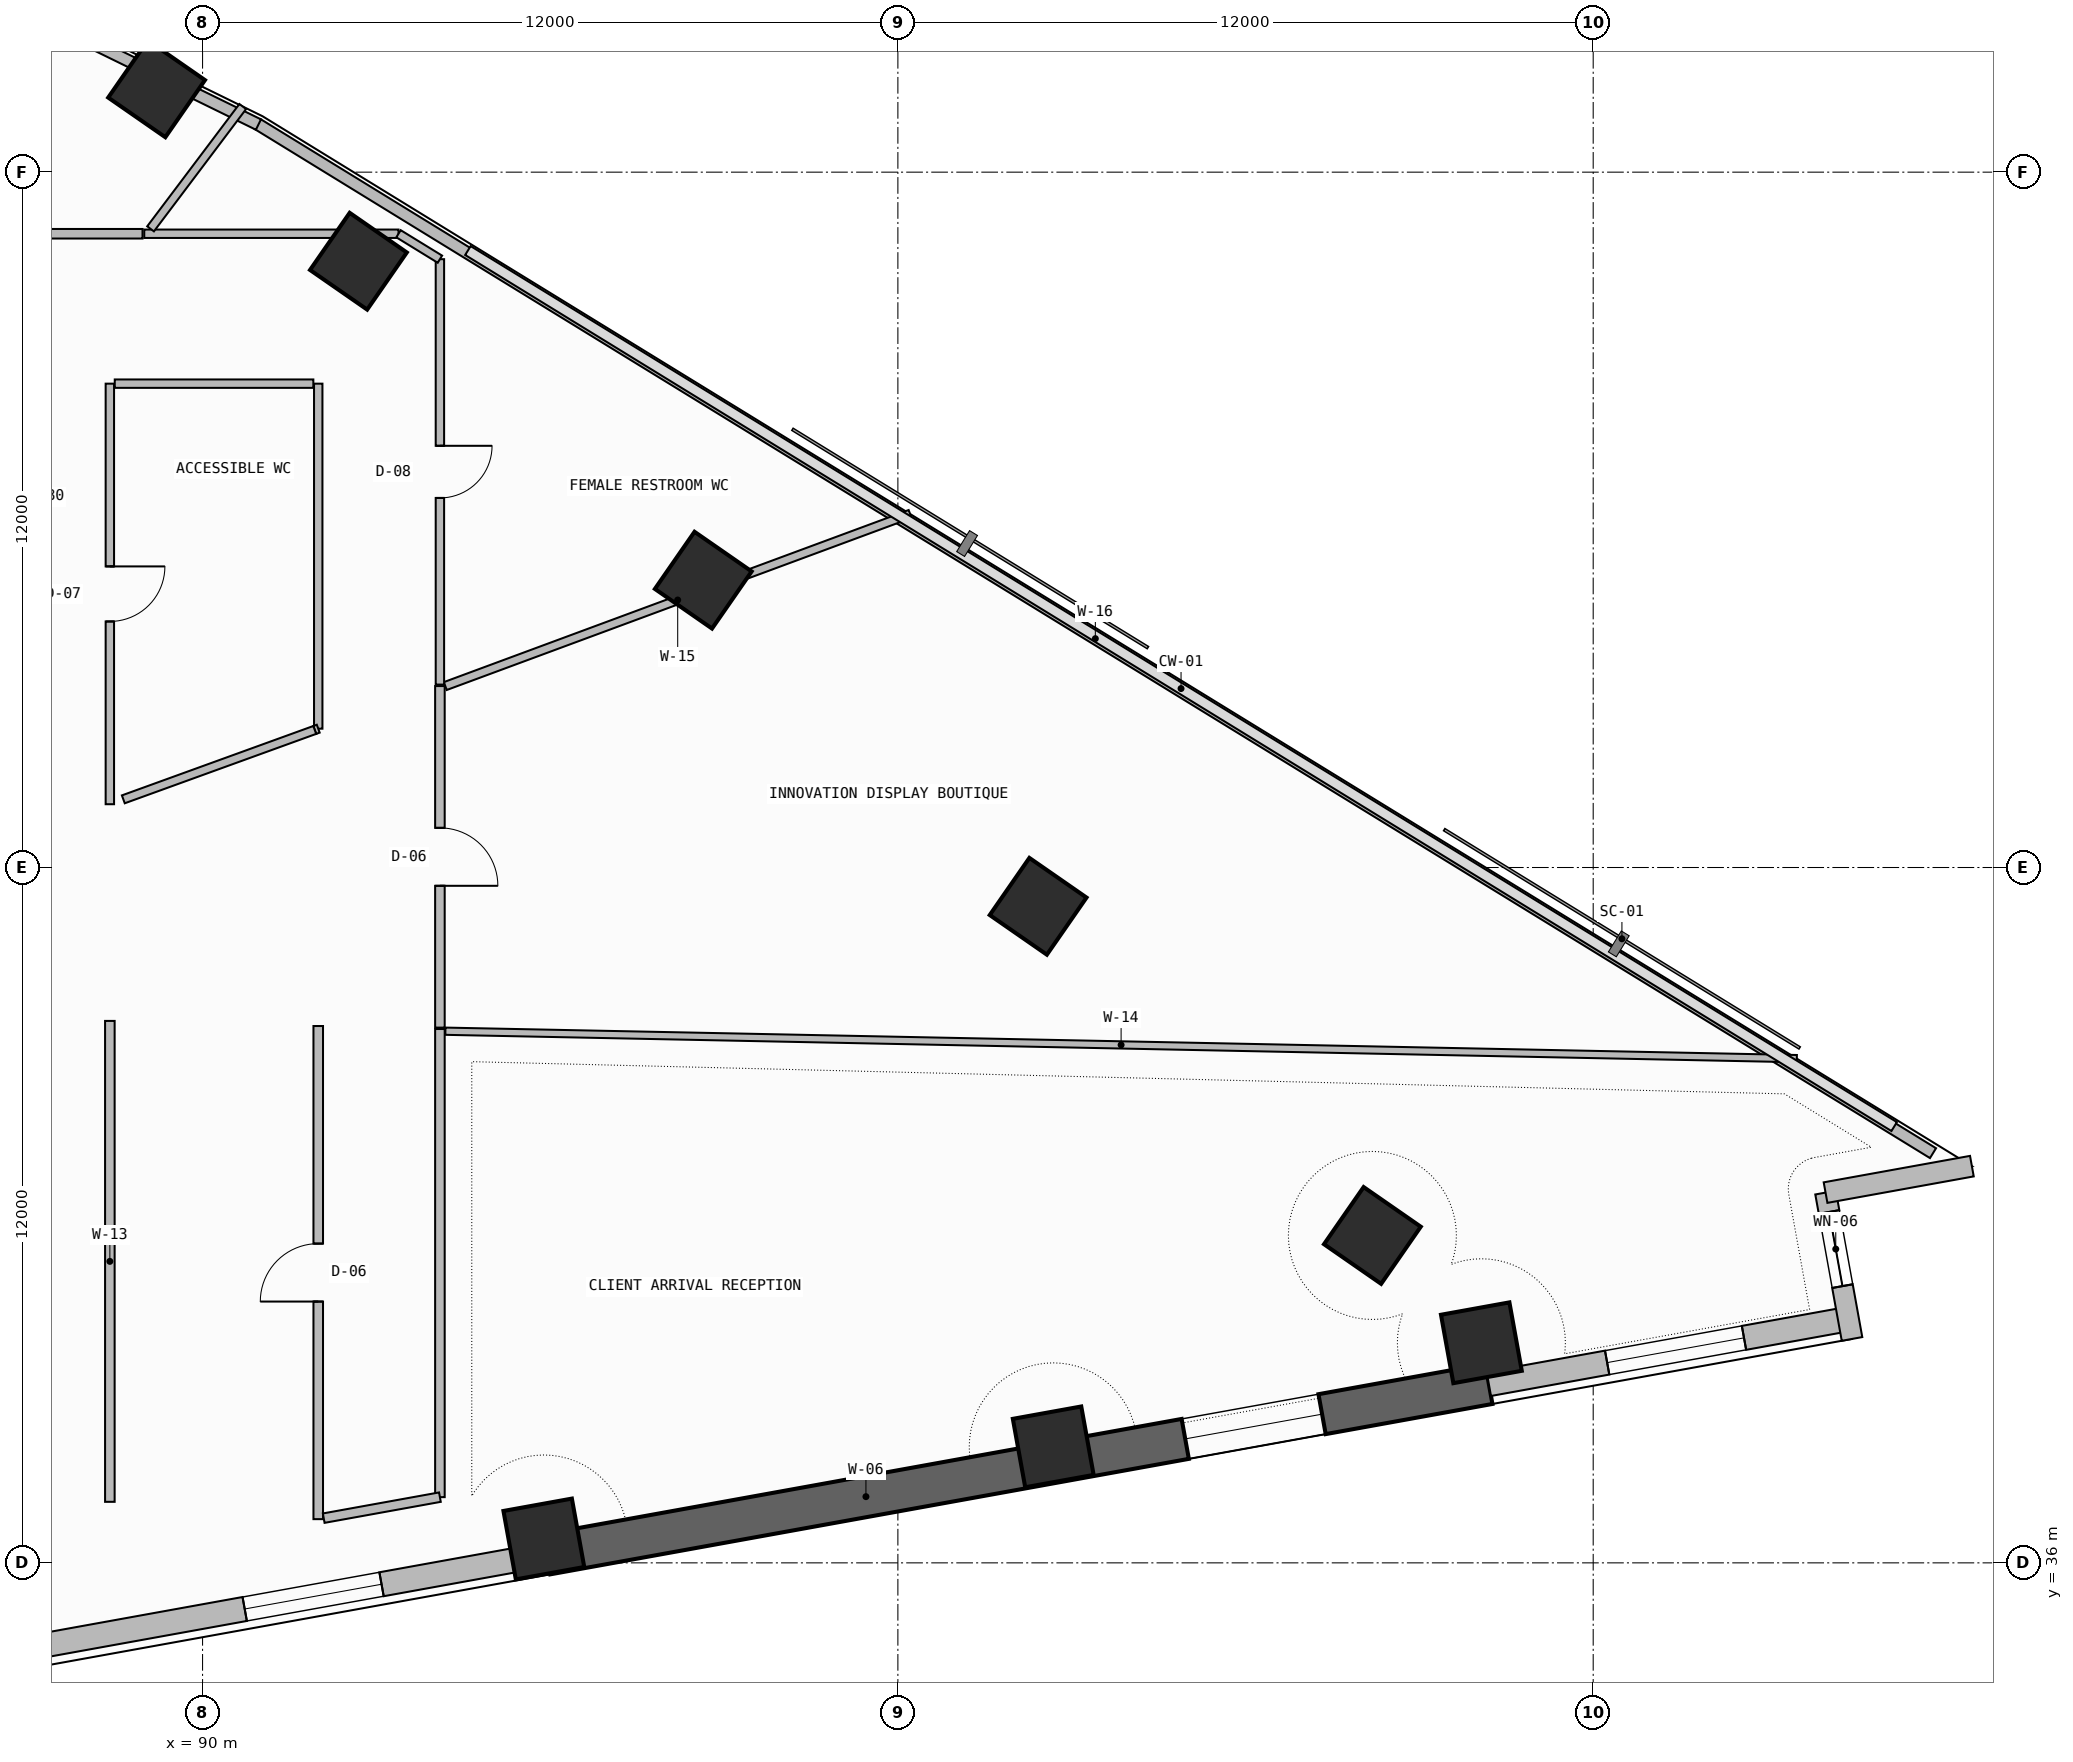
"""IFC4 building model, lengths in metres.
Left out: names, types, materials, properties, quantities, classifications, styles, units other than length and angle.
Written with IfcOpenShell. Run it as: python <this file> out.ifc"""

import sys

from ifc_helpers import new_model, si_unit, direction, frame, frame_2d, origin, origin_2d, place, context, subcontext, project, spatial, rectangle, extrude, element, fill, save


model = new_model("IFC4")
c1 = context("Model", 3, precision=1e-05, world=origin(), true_north=direction((0.0, 1.0)))
c2 = subcontext(c1, "Body", "Model", "MODEL_VIEW")
j1 = project(units=[si_unit("LENGTHUNIT", "METRE"), si_unit("PLANEANGLEUNIT", "RADIAN")], contexts=[c1])
p1 = place(None, origin())
s1 = spatial("IfcSite", under=j1, at=p1, CompositionType="ELEMENT")
p2 = place(p1, origin())
s2 = spatial("IfcBuilding", under=s1, at=p2, CompositionType="ELEMENT")
p3 = place(p2, frame((0.0, 0.0, 106.5)))
s3 = spatial("IfcBuildingStorey", under=s2, at=p3, CompositionType="ELEMENT", Elevation=106.5)
for number, where, z_axis, x_axis in (
    (1, (95.89, 36.412, 0.0), (0.0, 0.0, 1.0), (0.984, 0.178, 0.0)),
    (2, (104.681, 38.001, 0.0), (0.0, 0.0, 1.0), (0.984, 0.178, 0.0)),
    (3, (112.07, 39.798, 0.0), (0.0, 0.0, 1.0), (0.984, 0.178, 0.0)),
    (4, (110.189, 41.65, 0.0), (0.0, 0.0, 1.0), (0.57, 0.822, 0.0)),
    (5, (104.42, 47.331, 0.0), (0.0, 0.0, 1.0), (0.57, 0.822, 0.0)),
    (6, (98.641, 52.958, 0.0), (0.0, 0.0, 1.0), (0.57, 0.822, 0.0)),
    (7, (92.69, 58.463, 0.0), (0.0, 0.0, 1.0), (0.57, 0.822, 0.0)),
    (8, (89.207, 61.438, 0.0), (0.0, 0.0, 1.0), (0.57, 0.822, 0.0)),
):
    element("IfcColumn", number, at=place(p3, frame(where, z_axis=z_axis, x_axis=x_axis)), inside=s3, PredefinedType="COLUMN", context=c2, shape_type="SweptSolid", body=[
        extrude(rectangle(XDim=1.2, YDim=1.2, at=origin_2d()), origin(), (0.0, 0.0, 1.0), 3.6),
    ])
p4 = place(p3, frame((86.1, 34.367, 0.0), z_axis=(0.0, 0.0, 1.0), x_axis=(0.9840437071, 0.177926902172, 0.0)))
e9 = element("IfcWall", 9, at=p4, inside=s3, PredefinedType="SOLIDWALL", context=c2, shape_type="SweptSolid", body=[
    extrude(rectangle(XDim=9.997, YDim=0.42, at=frame_2d((4.999, 0.0))), origin(), (0.0, 0.0, 1.0), 2.325),
])
p5 = place(p4, frame((4.702, 0.0, 1.2)))
e10 = element("IfcOpeningElement", 10, at=p5, cuts=e9, PredefinedType="OPENING", context=c2, shape_type="SweptSolid", body=[
    extrude(rectangle(XDim=2.4, YDim=0.9, at=frame_2d((1.2, 0.45))), frame((0.0, 0.22, 0.0), z_axis=(0.0, -1.0, 0.0), x_axis=(1.0, 0.0, 0.0)), (0.0, 0.0, 1.0), 0.44),
])
p6 = place(p3, frame((95.938, 36.146, -0.26), z_axis=(0.0, 0.0, 1.0), x_axis=(0.984038488288, 0.177955762952, 0.0)))
e11 = element("IfcWall", 11, at=p6, inside=s3, PredefinedType="SHEAR", context=c2, shape_type="SweptSolid", body=[
    extrude(rectangle(XDim=16.525, YDim=0.7, at=frame_2d((8.262, 0.0))), origin(), (0.0, 0.0, 1.0), 3.6),
])
p7 = place(p6, frame((11.2, 0.0, 1.2)))
e12 = element("IfcOpeningElement", 12, at=p7, cuts=e11, PredefinedType="OPENING", context=c2, shape_type="SweptSolid", body=[
    extrude(rectangle(XDim=2.4, YDim=0.9, at=frame_2d((1.2, 0.45))), frame((0.0, 0.36, 0.0), z_axis=(0.0, -1.0, 0.0), x_axis=(1.0, 0.0, 0.0)), (0.0, 0.0, 1.0), 0.72),
])
p8 = place(p3, frame((112.199, 39.087, 0.0), z_axis=(0.0, 0.0, 1.0), x_axis=(0.984042888215, 0.177931431042, 0.0)))
e13 = element("IfcWall", 13, at=p8, inside=s3, PredefinedType="SOLIDWALL", context=c2, shape_type="SweptSolid", body=[
    extrude(rectangle(XDim=6.306, YDim=0.42, at=frame_2d((3.153, 0.0))), origin(), (0.0, 0.0, 1.0), 3.34),
])
p9 = place(p8, frame((2.075, 0.0, 1.2)))
e14 = element("IfcOpeningElement", 14, at=p9, cuts=e13, PredefinedType="OPENING", context=c2, shape_type="SweptSolid", body=[
    extrude(rectangle(XDim=2.4, YDim=0.9, at=frame_2d((1.2, 0.45))), frame((0.0, 0.22, 0.0), z_axis=(0.0, -1.0, 0.0), x_axis=(1.0, 0.0, 0.0)), (0.0, 0.0, 1.0), 0.44),
])
p10 = place(p3, frame((118.467, 39.864, 0.0), z_axis=(0.0, 0.0, 1.0), x_axis=(-0.177897493713, 0.984049024048, 0.0)))
e15 = element("IfcWall", 15, at=p10, inside=s3, PredefinedType="SOLIDWALL", context=c2, shape_type="SweptSolid", body=[
    extrude(rectangle(XDim=2.566, YDim=0.36, at=frame_2d((1.283, 0.0))), origin(), (0.0, 0.0, 1.0), 3.34),
])
p11 = place(p10, frame((0.926, 0.0, 0.45)))
e16 = element("IfcOpeningElement", 16, at=p11, cuts=e15, PredefinedType="OPENING", context=c2, shape_type="SweptSolid", body=[
    extrude(rectangle(XDim=1.3, YDim=2.4, at=frame_2d((0.65, 1.2))), frame((0.0, 0.19, 0.0), z_axis=(0.0, -1.0, 0.0), x_axis=(1.0, 0.0, 0.0)), (0.0, 0.0, 1.0), 0.38),
])
p12 = place(p3, frame((118.01, 42.39, 0.0), z_axis=(0.0, 0.0, 1.0), x_axis=(0.984046012923, 0.177914149102, 0.0)))
e17 = element("IfcWall", 17, at=p12, inside=s3, PredefinedType="SOLIDWALL", context=c2, shape_type="SweptSolid", body=[
    extrude(rectangle(XDim=2.566, YDim=0.36, at=frame_2d((1.283, 0.0))), origin(), (0.0, 0.0, 1.0), 3.34),
])
p13 = place(p3, frame((119.865, 43.07, 0.0), z_axis=(0.0, 0.0, 1.0), x_axis=(-0.852110824326, 0.52336138859, 0.0)))
e18 = element("IfcWall", 18, at=p13, inside=s3, PredefinedType="PARAPET", context=c2, shape_type="SweptSolid", body=[
    extrude(rectangle(XDim=33.932, YDim=0.2, at=frame_2d((16.966, 0.0))), origin(), (0.0, 0.0, 1.0), 1.15),
])
p14 = place(p3, frame((90.964, 60.822, 0.0), z_axis=(0.0, 0.0, 1.0), x_axis=(-0.898000468284, 0.439994498787, 0.0)))
e19 = element("IfcWall", 19, at=p14, inside=s3, PredefinedType="PARAPET", context=c2, shape_type="SweptSolid", body=[
    extrude(rectangle(XDim=1.423, YDim=0.2, at=frame_2d((0.712, 0.0))), origin(), (0.0, 0.0, 1.0), 1.15),
])
p15 = place(p3, frame((88.921, 61.823, 0.0), z_axis=(0.0, 0.0, 1.0), x_axis=(-0.897993533426, 0.440008652103, 0.0)))
e20 = element("IfcWall", 20, at=p15, inside=s3, PredefinedType="PARAPET", context=c2, shape_type="SweptSolid", body=[
    extrude(rectangle(XDim=26.864, YDim=0.2, at=frame_2d((13.432, 0.0))), origin(), (0.0, 0.0, 1.0), 1.15),
])
p16 = place(p3, frame((91.996, 45.264, 0.0), z_axis=(0.0, 0.0, 1.0), x_axis=(0.0, -1.0, 0.0)))
e21 = element("IfcWall", 21, at=p16, inside=s3, PredefinedType="PARTITIONING", context=c2, shape_type="SweptSolid", body=[
    extrude(rectangle(XDim=8.51, YDim=0.165, at=frame_2d((4.255, 0.0))), origin(), (0.0, 0.0, 1.0), 2.725),
])
p17 = place(p16, frame((3.755, 0.0, 0.0)))
e22 = element("IfcOpeningElement", 22, at=p17, cuts=e21, PredefinedType="OPENING", context=c2, shape_type="SweptSolid", body=[
    extrude(rectangle(XDim=1.0, YDim=2.2, at=frame_2d((0.5, 1.1))), frame((0.0, 0.093, 0.0), z_axis=(0.0, -1.0, 0.0), x_axis=(1.0, 0.0, 0.0)), (0.0, 0.0, 1.0), 0.185),
])
p18 = place(p3, frame((88.4, 37.053, 0.0), z_axis=(0.0, 0.0, 1.0), x_axis=(0.0, 1.0, 0.0)))
e23 = element("IfcWall", 23, at=p18, inside=s3, PredefinedType="PARTITIONING", context=c2, shape_type="SweptSolid", body=[
    extrude(rectangle(XDim=8.299, YDim=0.165, at=frame_2d((4.15, 0.0))), origin(), (0.0, 0.0, 1.0), 2.725),
])
p19 = place(p3, frame((94.096, 37.134, 0.0), z_axis=(0.0, 0.0, 1.0), x_axis=(0.0, 1.0, 0.0)))
e24 = element("IfcWall", 24, at=p19, inside=s3, PredefinedType="PARTITIONING", context=c2, shape_type="SweptSolid", body=[
    extrude(rectangle(XDim=8.079, YDim=0.165, at=frame_2d((4.04, 0.0))), origin(), (0.0, 0.0, 1.0), 2.725),
])
p20 = place(p3, frame((92.091, 36.771, 0.0), z_axis=(0.0, 0.0, 1.0), x_axis=(0.984047685875, 0.17790489573, 0.0)))
e25 = element("IfcWall", 25, at=p20, inside=s3, PredefinedType="PARTITIONING", context=c2, shape_type="SweptSolid", body=[
    extrude(rectangle(XDim=2.038, YDim=0.165, at=frame_2d((1.019, 0.0))), origin(), (0.0, 0.0, 1.0), 3.34),
])
p21 = place(p3, frame((94.191, 45.175, 0.0), z_axis=(0.0, 0.0, 1.0), x_axis=(0.99979429886, -0.020282010941, 0.0)))
e26 = element("IfcWall", 26, at=p21, inside=s3, PredefinedType="PARTITIONING", context=c2, shape_type="SweptSolid", body=[
    extrude(rectangle(XDim=23.328, YDim=0.125, at=frame_2d((11.664, 0.0))), origin(), (0.0, 0.0, 1.0), 2.725),
])
p22 = place(p3, frame((94.096, 45.237, 0.0), z_axis=(0.0, 0.0, 1.0), x_axis=(0.0, 1.0, 0.0)))
e27 = element("IfcWall", 27, at=p22, inside=s3, PredefinedType="PARTITIONING", context=c2, shape_type="SweptSolid", body=[
    extrude(rectangle(XDim=5.894, YDim=0.165, at=frame_2d((2.947, 0.0))), origin(), (0.0, 0.0, 1.0), 2.725),
])
p23 = place(p22, frame((2.447, 0.0, 0.0)))
e28 = element("IfcOpeningElement", 28, at=p23, cuts=e27, PredefinedType="OPENING", context=c2, shape_type="SweptSolid", body=[
    extrude(rectangle(XDim=1.0, YDim=2.2, at=frame_2d((0.5, 1.1))), frame((0.0, 0.093, 0.0), z_axis=(0.0, -1.0, 0.0), x_axis=(1.0, 0.0, 0.0)), (0.0, 0.0, 1.0), 0.185),
])
p24 = place(p3, frame((94.189, 51.131, 0.0), z_axis=(0.0, 0.0, 1.0), x_axis=(0.937797640871, 0.347182350901, 0.0)))
e29 = element("IfcWall", 29, at=p24, inside=s3, PredefinedType="PARTITIONING", context=c2, shape_type="SweptSolid", body=[
    extrude(rectangle(XDim=8.554, YDim=0.145, at=frame_2d((4.277, 0.0))), origin(), (0.0, 0.0, 1.0), 2.725),
])
p25 = place(p3, frame((94.096, 51.157, 0.0), z_axis=(0.0, 0.0, 1.0), x_axis=(0.0, 1.0, 0.0)))
e30 = element("IfcWall", 30, at=p25, inside=s3, PredefinedType="PARTITIONING", context=c2, shape_type="SweptSolid", body=[
    extrude(rectangle(XDim=7.341, YDim=0.145, at=frame_2d((3.671, 0.0))), origin(), (0.0, 0.0, 1.0), 2.725),
])
p26 = place(p25, frame((3.221, 0.0, 0.0)))
e31 = element("IfcOpeningElement", 31, at=p26, cuts=e30, PredefinedType="OPENING", context=c2, shape_type="SweptSolid", body=[
    extrude(rectangle(XDim=0.9, YDim=2.1, at=frame_2d((0.45, 1.05))), frame((0.0, 0.083, 0.0), z_axis=(0.0, -1.0, 0.0), x_axis=(1.0, 0.0, 0.0)), (0.0, 0.0, 1.0), 0.165),
])
p27 = place(p3, frame((93.382, 58.937, 0.0), z_axis=(0.0, 0.0, 1.0), x_axis=(-1.0, 0.0, 0.0)))
e32 = element("IfcWall", 32, at=p27, inside=s3, PredefinedType="PARTITIONING", context=c2, shape_type="SweptSolid", body=[
    extrude(rectangle(XDim=4.388, YDim=0.145, at=frame_2d((2.194, 0.0))), origin(), (0.0, 0.0, 1.0), 2.725),
])
p28 = place(p3, frame((94.096, 58.498, 0.0), z_axis=(0.0, 0.0, 1.0), x_axis=(-0.852077841053, 0.52341508651, 0.0)))
e33 = element("IfcWall", 33, at=p28, inside=s3, PredefinedType="PARTITIONING", context=c2, shape_type="SweptSolid", body=[
    extrude(rectangle(XDim=0.839, YDim=0.145, at=frame_2d((0.419, 0.0))), origin(), (0.0, 0.0, 1.0), 3.34),
])
p29 = place(p3, frame((89.103, 59.021, 0.0), z_axis=(0.0, 0.0, 1.0), x_axis=(0.601816091095, 0.798634705294, 0.0)))
e34 = element("IfcWall", 34, at=p29, inside=s3, PredefinedType="PARTITIONING", context=c2, shape_type="SweptSolid", body=[
    extrude(rectangle(XDim=2.643, YDim=0.145, at=frame_2d((1.322, 0.0))), origin(), (0.0, 0.0, 1.0), 2.725),
])
p30 = place(p3, frame((88.4, 49.092, 0.0), z_axis=(0.0, 0.0, 1.0), x_axis=(0.0, 1.0, 0.0)))
e35 = element("IfcWall", 35, at=p30, inside=s3, PredefinedType="PARTITIONING", context=c2, shape_type="SweptSolid", body=[
    extrude(rectangle(XDim=7.258, YDim=0.145, at=frame_2d((3.629, 0.0))), origin(), (0.0, 0.0, 1.0), 2.725),
])
p31 = place(p30, frame((3.154, 0.0, 0.0)))
e36 = element("IfcOpeningElement", 36, at=p31, cuts=e35, PredefinedType="OPENING", context=c2, shape_type="SweptSolid", body=[
    extrude(rectangle(XDim=0.95, YDim=2.15, at=frame_2d((0.475, 1.075))), frame((0.0, 0.083, 0.0), z_axis=(0.0, -1.0, 0.0), x_axis=(1.0, 0.0, 0.0)), (0.0, 0.0, 1.0), 0.165),
])
p32 = place(p3, frame((91.996, 56.35, 0.0), z_axis=(0.0, 0.0, 1.0), x_axis=(0.0, -1.0, 0.0)))
e37 = element("IfcWall", 37, at=p32, inside=s3, PredefinedType="PARTITIONING", context=c2, shape_type="SweptSolid", body=[
    extrude(rectangle(XDim=5.954, YDim=0.145, at=frame_2d((2.977, 0.0))), origin(), (0.0, 0.0, 1.0), 2.725),
])
p33 = place(p3, frame((88.485, 56.35, 0.0), z_axis=(0.0, 0.0, 1.0), x_axis=(1.0, 0.0, 0.0)))
e38 = element("IfcWall", 38, at=p33, inside=s3, PredefinedType="PARTITIONING", context=c2, shape_type="SweptSolid", body=[
    extrude(rectangle(XDim=3.427, YDim=0.145, at=frame_2d((1.714, 0.0))), origin(), (0.0, 0.0, 1.0), 2.875),
])
p34 = place(p3, frame((91.996, 50.396, 0.0), z_axis=(0.0, 0.0, 1.0), x_axis=(-0.93912285212, -0.343581531264, 0.0)))
e39 = element("IfcWall", 39, at=p34, inside=s3, PredefinedType="PARTITIONING", context=c2, shape_type="SweptSolid", body=[
    extrude(rectangle(XDim=0.064, YDim=0.145, at=frame_2d((0.032, 0.0))), origin(), (0.0, 0.0, 1.0), 3.34),
])
p35 = place(p3, frame((88.963, 58.937, 0.0), z_axis=(0.0, 0.0, 1.0), x_axis=(-1.0, 0.0, 0.0)))
e40 = element("IfcWall", 40, at=p35, inside=s3, PredefinedType="PARTITIONING", context=c2, shape_type="SweptSolid", body=[
    extrude(rectangle(XDim=10.845, YDim=0.165, at=frame_2d((5.422, 0.0))), origin(), (0.0, 0.0, 1.0), 2.725),
])
p36 = place(p35, frame((6.339, 0.0, 0.0)))
e41 = element("IfcOpeningElement", 41, at=p36, cuts=e40, PredefinedType="OPENING", context=c2, shape_type="SweptSolid", body=[
    extrude(rectangle(XDim=1.0, YDim=2.2, at=frame_2d((0.5, 1.1))), frame((0.0, 0.093, 0.0), z_axis=(0.0, -1.0, 0.0), x_axis=(1.0, 0.0, 0.0)), (0.0, 0.0, 1.0), 0.185),
])
p37 = place(p3, frame((91.936, 50.374, 0.0), z_axis=(0.0, 0.0, 1.0), x_axis=(-0.940166112984, -0.340716421672, 0.0)))
e42 = element("IfcWall", 42, at=p37, inside=s3, PredefinedType="PARTITIONING", context=c2, shape_type="SweptSolid", body=[
    extrude(rectangle(XDim=3.514, YDim=0.145, at=frame_2d((1.757, 0.0))), origin(), (0.0, 0.0, 1.0), 2.875),
])
p38 = place(p5, origin())
e43 = element("IfcWindow", 43, at=p38, inside=s3, PartitioningType="SINGLE_PANEL", PredefinedType="WINDOW", context=c2, shape_type="SweptSolid", body=[
    extrude(rectangle(XDim=2.4, YDim=0.9, at=frame_2d((1.2, 0.45))), frame((0.0, 0.03, 0.0), z_axis=(0.0, -1.0, 0.0), x_axis=(1.0, 0.0, 0.0)), (0.0, 0.0, 1.0), 0.06),
])
fill(e10, e43)
p39 = place(p7, origin())
e44 = element("IfcWindow", 44, at=p39, inside=s3, PartitioningType="SINGLE_PANEL", PredefinedType="WINDOW", context=c2, shape_type="SweptSolid", body=[
    extrude(rectangle(XDim=2.4, YDim=0.9, at=frame_2d((1.2, 0.45))), frame((0.0, 0.03, 0.0), z_axis=(0.0, -1.0, 0.0), x_axis=(1.0, 0.0, 0.0)), (0.0, 0.0, 1.0), 0.06),
])
fill(e12, e44)
p40 = place(p9, origin())
e45 = element("IfcWindow", 45, at=p40, inside=s3, PartitioningType="SINGLE_PANEL", PredefinedType="WINDOW", context=c2, shape_type="SweptSolid", body=[
    extrude(rectangle(XDim=2.4, YDim=0.9, at=frame_2d((1.2, 0.45))), frame((0.0, 0.03, 0.0), z_axis=(0.0, -1.0, 0.0), x_axis=(1.0, 0.0, 0.0)), (0.0, 0.0, 1.0), 0.06),
])
fill(e14, e45)
p41 = place(p11, origin())
e46 = element("IfcWindow", 46, at=p41, inside=s3, PartitioningType="SINGLE_PANEL", PredefinedType="WINDOW", context=c2, shape_type="SweptSolid", body=[
    extrude(rectangle(XDim=1.3, YDim=2.4, at=frame_2d((0.65, 1.2))), frame((0.0, 0.03, 0.0), z_axis=(0.0, -1.0, 0.0), x_axis=(1.0, 0.0, 0.0)), (0.0, 0.0, 1.0), 0.06),
])
fill(e16, e46)
p42 = place(p17, frame((1.0, 0.0, 0.0), z_axis=(0.0, 0.0, 1.0), x_axis=(-1.0, 0.0, 0.0)))
e47 = element("IfcDoor", 47, at=p42, inside=s3, OperationType="SINGLE_SWING_LEFT", PredefinedType="DOOR", context=c2, shape_type="SweptSolid", body=[
    extrude(rectangle(XDim=1.0, YDim=2.2, at=frame_2d((0.5, 1.1))), frame((0.0, 0.025, 0.0), z_axis=(0.0, -1.0, 0.0), x_axis=(1.0, 0.0, 0.0)), (0.0, 0.0, 1.0), 0.05),
])
fill(e22, e47)
p43 = place(p23, frame((1.0, 0.0, 0.0), z_axis=(0.0, 0.0, 1.0), x_axis=(-1.0, 0.0, 0.0)))
e48 = element("IfcDoor", 48, at=p43, inside=s3, OperationType="SINGLE_SWING_RIGHT", PredefinedType="DOOR", context=c2, shape_type="SweptSolid", body=[
    extrude(rectangle(XDim=1.0, YDim=2.2, at=frame_2d((0.5, 1.1))), frame((0.0, 0.025, 0.0), z_axis=(0.0, -1.0, 0.0), x_axis=(1.0, 0.0, 0.0)), (0.0, 0.0, 1.0), 0.05),
])
fill(e28, e48)
p44 = place(p26, frame((0.9, 0.0, 0.0), z_axis=(0.0, 0.0, 1.0), x_axis=(-1.0, 0.0, 0.0)))
e49 = element("IfcDoor", 49, at=p44, inside=s3, OperationType="SINGLE_SWING_LEFT", PredefinedType="DOOR", context=c2, shape_type="SweptSolid", body=[
    extrude(rectangle(XDim=0.9, YDim=2.1, at=frame_2d((0.45, 1.05))), frame((0.0, 0.025, 0.0), z_axis=(0.0, -1.0, 0.0), x_axis=(1.0, 0.0, 0.0)), (0.0, 0.0, 1.0), 0.05),
])
fill(e31, e49)
p45 = place(p31, frame((0.95, 0.0, 0.0), z_axis=(0.0, 0.0, 1.0), x_axis=(-1.0, 0.0, 0.0)))
e50 = element("IfcDoor", 50, at=p45, inside=s3, OperationType="SINGLE_SWING_LEFT", PredefinedType="DOOR", context=c2, shape_type="SweptSolid", body=[
    extrude(rectangle(XDim=0.95, YDim=2.15, at=frame_2d((0.475, 1.075))), frame((0.0, 0.025, 0.0), z_axis=(0.0, -1.0, 0.0), x_axis=(1.0, 0.0, 0.0)), (0.0, 0.0, 1.0), 0.05),
])
fill(e36, e50)
save(model, sys.argv[1])
